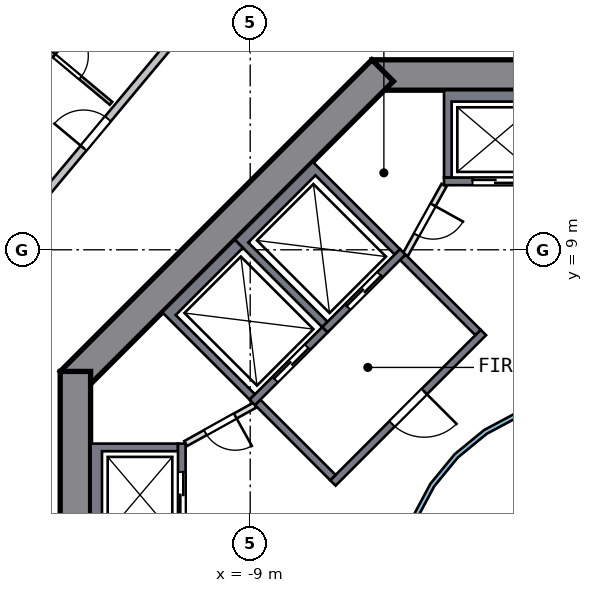
"""IFC4 building model, lengths in metres.
Left out: names, types, materials, properties, quantities, classifications, styles, units other than length and angle.
Written with IfcOpenShell. Run it as: python <this file> out.ifc"""

import sys

from ifc_helpers import new_model, si_unit, direction, frame, frame_2d, origin, place, context, subcontext, project, spatial, polyline, rectangle, outline, extrude, element, fill, save


model = new_model("IFC4")
c1 = context("Model", 3, precision=1e-05, world=origin(), true_north=direction((0.0, 1.0)))
c2 = subcontext(c1, "Body", "Model", "MODEL_VIEW")
j1 = project(units=[si_unit("LENGTHUNIT", "METRE"), si_unit("PLANEANGLEUNIT", "RADIAN")], contexts=[c1])
p1 = place(None, origin())
s1 = spatial("IfcSite", under=j1, at=p1, CompositionType="ELEMENT")
p2 = place(p1, origin())
s2 = spatial("IfcBuilding", under=s1, at=p2, CompositionType="ELEMENT")
p3 = place(p2, frame((0.0, 0.0, 115.0)))
s3 = spatial("IfcBuildingStorey", under=s2, at=p3, CompositionType="ELEMENT", Elevation=115.0)
p4 = place(p3, frame((5.799, 13.6, 0.0), z_axis=(0.0, 0.0, 1.0), x_axis=(-1.0, 0.0, 0.0)))
e1 = element("IfcWall", 1, at=p4, inside=s3, PredefinedType="SHEAR", context=c2, shape_type="SweptSolid", body=[
    extrude(rectangle(XDim=11.598, YDim=0.8, at=frame_2d((5.799, 0.0))), origin(), (0.0, 0.0, 1.0), 3.5),
])
p5 = place(p4, frame((4.899, 0.0, 0.0)))
e2 = element("IfcOpeningElement", 2, at=p5, cuts=e1, PredefinedType="OPENING", context=c2, shape_type="SweptSolid", body=[
    extrude(rectangle(XDim=1.8, YDim=2.1, at=frame_2d((0.9, 1.05))), frame((0.0, 0.41, 0.0), z_axis=(0.0, -1.0, 0.0), x_axis=(1.0, 0.0, 0.0)), (0.0, 0.0, 1.0), 0.82),
])
p6 = place(p3, frame((-5.516, 13.717, 0.0), z_axis=(0.0, 0.0, 1.0), x_axis=(-0.707106781, -0.707106781, 0.0)))
e3 = element("IfcWall", 3, at=p6, inside=s3, PredefinedType="SHEAR", context=c2, shape_type="SweptSolid", body=[
    extrude(rectangle(XDim=11.598, YDim=0.8, at=frame_2d((5.799, 0.0))), origin(), (0.0, 0.0, 1.0), 3.5),
])
p7 = place(p3, frame((-13.6, 5.799, 0.0), z_axis=(0.0, 0.0, 1.0), x_axis=(0.0, -1.0, 0.0)))
e4 = element("IfcWall", 4, at=p7, inside=s3, PredefinedType="SHEAR", context=c2, shape_type="SweptSolid", body=[
    extrude(rectangle(XDim=11.598, YDim=0.8, at=frame_2d((5.799, 0.0))), origin(), (0.0, 0.0, 1.0), 3.5),
])
p8 = place(p7, frame((4.899, 0.0, 0.0)))
e5 = element("IfcOpeningElement", 5, at=p8, cuts=e4, PredefinedType="OPENING", context=c2, shape_type="SweptSolid", body=[
    extrude(rectangle(XDim=1.8, YDim=2.1, at=frame_2d((0.9, 1.05))), frame((0.0, 0.41, 0.0), z_axis=(0.0, -1.0, 0.0), x_axis=(1.0, 0.0, 0.0)), (0.0, 0.0, 1.0), 0.82),
])
p9 = place(p3, origin())
e6 = element("IfcWall", 6, at=p9, inside=s3, PredefinedType="SOLIDWALL", context=c2, shape_type="SweptSolid", body=[
    extrude(outline(polyline([(-3.9, 10.9), (-3.9, 13.2), (-1.2, 13.2), (-1.2, 10.9), (-1.4, 10.9), (-1.4, 12.9), (-3.7, 12.9), (-3.7, 10.9), (-3.9, 10.9)])), origin(), (0.0, 0.0, 1.0), 3.19),
])
p10 = place(p3, frame((-1.2, 10.8, 0.0), z_axis=(0.0, 0.0, 1.0), x_axis=(-1.0, 0.0, 0.0)))
e7 = element("IfcWall", 7, at=p10, inside=s3, PredefinedType="SOLIDWALL", context=c2, shape_type="SweptSolid", body=[
    extrude(rectangle(XDim=2.7, YDim=0.2, at=frame_2d((1.35, 0.0))), origin(), (0.0, 0.0, 1.0), 3.19),
])
p11 = place(p10, frame((0.75, 0.0, 0.0)))
e8 = element("IfcOpeningElement", 8, at=p11, cuts=e7, PredefinedType="OPENING", context=c2, shape_type="SweptSolid", body=[
    extrude(rectangle(XDim=1.2, YDim=2.1, at=frame_2d((0.6, 1.05))), frame((0.0, 0.11, 0.0), z_axis=(0.0, -1.0, 0.0), x_axis=(1.0, 0.0, 0.0)), (0.0, 0.0, 1.0), 0.22),
])
p12 = place(p3, origin())
e9 = element("IfcWall", 9, at=p12, inside=s3, PredefinedType="SOLIDWALL", context=c2, shape_type="SweptSolid", body=[
    extrude(outline(polyline([(-13.2, 3.9), (-10.9, 3.9), (-10.9, 3.7), (-12.9, 3.7), (-12.9, 1.4), (-10.9, 1.4), (-10.9, 1.2), (-13.2, 1.2), (-13.2, 3.9)])), origin(), (0.0, 0.0, 1.0), 3.19),
])
p13 = place(p3, frame((-10.8, 1.2, 0.0), z_axis=(0.0, 0.0, 1.0), x_axis=(0.0, 1.0, 0.0)))
e10 = element("IfcWall", 10, at=p13, inside=s3, PredefinedType="SOLIDWALL", context=c2, shape_type="SweptSolid", body=[
    extrude(rectangle(XDim=2.7, YDim=0.2, at=frame_2d((1.35, 0.0))), origin(), (0.0, 0.0, 1.0), 3.19),
])
p14 = place(p13, frame((0.75, 0.0, 0.0)))
e11 = element("IfcOpeningElement", 11, at=p14, cuts=e10, PredefinedType="OPENING", context=c2, shape_type="SweptSolid", body=[
    extrude(rectangle(XDim=1.2, YDim=2.1, at=frame_2d((0.6, 1.05))), frame((0.0, 0.11, 0.0), z_axis=(0.0, -1.0, 0.0), x_axis=(1.0, 0.0, 0.0)), (0.0, 0.0, 1.0), 0.22),
])
p15 = place(p3, origin())
e12 = element("IfcWall", 12, at=p15, inside=s3, PredefinedType="SOLIDWALL", context=c2, shape_type="SweptSolid", body=[
    extrude(outline(polyline([(-9.405, 9.263), (-7.354, 11.314), (-5.056, 9.016), (-5.197, 8.874), (-7.283, 10.96), (-9.051, 9.192), (-6.965, 7.106), (-7.106, 6.965), (-9.405, 9.263)])), origin(), (0.0, 0.0, 1.0), 3.19),
])
p16 = place(p3, frame((-4.985, 8.945, 0.0), z_axis=(0.0, 0.0, 1.0), x_axis=(-0.707106781, -0.707106781, 0.0)))
e13 = element("IfcWall", 13, at=p16, inside=s3, PredefinedType="SOLIDWALL", context=c2, shape_type="SweptSolid", body=[
    extrude(rectangle(XDim=2.9, YDim=0.2, at=frame_2d((1.45, 0.0))), origin(), (0.0, 0.0, 1.0), 3.19),
])
p17 = place(p16, frame((0.85, 0.0, 0.0)))
e14 = element("IfcOpeningElement", 14, at=p17, cuts=e13, PredefinedType="OPENING", context=c2, shape_type="SweptSolid", body=[
    extrude(rectangle(XDim=1.2, YDim=2.1, at=frame_2d((0.6, 1.05))), frame((0.0, 0.11, 0.0), z_axis=(0.0, -1.0, 0.0), x_axis=(1.0, 0.0, 0.0)), (0.0, 0.0, 1.0), 0.22),
])
p18 = place(p3, origin())
e15 = element("IfcWall", 15, at=p18, inside=s3, PredefinedType="SOLIDWALL", context=c2, shape_type="SweptSolid", body=[
    extrude(outline(polyline([(-11.314, 7.354), (-9.405, 9.263), (-9.192, 9.051), (-10.96, 7.283), (-8.874, 5.197), (-9.016, 5.056), (-11.314, 7.354)])), origin(), (0.0, 0.0, 1.0), 3.19),
])
p19 = place(p3, frame((-7.036, 6.894, 0.0), z_axis=(0.0, 0.0, 1.0), x_axis=(-0.707106781, -0.707106781, 0.0)))
e16 = element("IfcWall", 16, at=p19, inside=s3, PredefinedType="SOLIDWALL", context=c2, shape_type="SweptSolid", body=[
    extrude(rectangle(XDim=2.7, YDim=0.2, at=frame_2d((1.35, 0.0))), origin(), (0.0, 0.0, 1.0), 3.19),
])
p20 = place(p19, frame((0.65, 0.0, 0.0)))
e17 = element("IfcOpeningElement", 17, at=p20, cuts=e16, PredefinedType="OPENING", context=c2, shape_type="SweptSolid", body=[
    extrude(rectangle(XDim=1.2, YDim=2.1, at=frame_2d((0.6, 1.05))), frame((0.0, 0.11, 0.0), z_axis=(0.0, -1.0, 0.0), x_axis=(1.0, 0.0, 0.0)), (0.0, 0.0, 1.0), 0.22),
])
p21 = place(p3, frame((-2.864, 6.823, 0.0), z_axis=(0.0, 0.0, 1.0), x_axis=(-0.707106781, -0.707106781, 0.0)))
e18 = element("IfcWall", 18, at=p21, inside=s3, PredefinedType="SOLIDWALL", context=c2, shape_type="SweptSolid", body=[
    extrude(rectangle(XDim=5.6, YDim=0.2, at=frame_2d((2.8, 0.0))), origin(), (0.0, 0.0, 1.0), 3.19),
])
p22 = place(p21, frame((2.2, 0.0, 0.0)))
e19 = element("IfcOpeningElement", 19, at=p22, cuts=e18, PredefinedType="OPENING", context=c2, shape_type="SweptSolid", body=[
    extrude(rectangle(XDim=1.2, YDim=2.1, at=frame_2d((0.6, 1.05))), frame((0.0, 0.11, 0.0), z_axis=(0.0, -1.0, 0.0), x_axis=(1.0, 0.0, 0.0)), (0.0, 0.0, 1.0), 0.22),
])
for number, where, z_axis, x_axis in (
    (20, (-3.005, 6.823, 0.0), (0.0, 0.0, 1.0), (-0.707, 0.707, 0.0)),
    (21, (-6.823, 3.005, 0.0), (0.0, 0.0, 1.0), (-0.707, 0.707, 0.0)),
):
    element("IfcWall", number, at=place(p3, frame(where, z_axis=z_axis, x_axis=x_axis)), inside=s3, PredefinedType="SOLIDWALL", context=c2, shape_type="SweptSolid", body=[
        extrude(rectangle(XDim=2.8, YDim=0.2, at=frame_2d((1.4, 0.0))), origin(), (0.0, 0.0, 1.0), 3.19),
    ])
p23 = place(p3, frame((-3.9, 10.7, 0.0), z_axis=(0.0, 0.0, 1.0), x_axis=(-0.485692555, -0.874129705, 0.0)))
e22 = element("IfcWall", 22, at=p23, inside=s3, PredefinedType="PARTITIONING", context=c2, shape_type="SweptSolid", body=[
    extrude(rectangle(XDim=2.089, YDim=0.15, at=frame_2d((1.044, 0.0))), origin(), (0.0, 0.0, 1.0), 3.19),
])
p24 = place(p23, frame((0.594, 0.0, 0.0)))
e23 = element("IfcOpeningElement", 23, at=p24, cuts=e22, PredefinedType="OPENING", context=c2, shape_type="SweptSolid", body=[
    extrude(rectangle(XDim=0.9, YDim=2.1, at=frame_2d((0.45, 1.05))), frame((0.0, 0.085, 0.0), z_axis=(0.0, -1.0, 0.0), x_axis=(1.0, 0.0, 0.0)), (0.0, 0.0, 1.0), 0.17),
])
p25 = place(p3, frame((-8.874, 4.914, 0.0), z_axis=(0.0, 0.0, 1.0), x_axis=(-0.874129705, -0.485692555, 0.0)))
e24 = element("IfcWall", 24, at=p25, inside=s3, PredefinedType="PARTITIONING", context=c2, shape_type="SweptSolid", body=[
    extrude(rectangle(XDim=2.089, YDim=0.15, at=frame_2d((1.044, 0.0))), origin(), (0.0, 0.0, 1.0), 3.19),
])
p26 = place(p25, frame((0.594, 0.0, 0.0)))
e25 = element("IfcOpeningElement", 25, at=p26, cuts=e24, PredefinedType="OPENING", context=c2, shape_type="SweptSolid", body=[
    extrude(rectangle(XDim=0.9, YDim=2.1, at=frame_2d((0.45, 1.05))), frame((0.0, 0.085, 0.0), z_axis=(0.0, -1.0, 0.0), x_axis=(1.0, 0.0, 0.0)), (0.0, 0.0, 1.0), 0.17),
])
p27 = place(p3, origin())
e26 = element("IfcWall", 26, at=p27, inside=s3, PredefinedType="SOLIDWALL", context=c2, shape_type="SweptSolid", body=[
    extrude(outline(polyline([(5.021, -0.999), (4.73, -1.959), (4.257, -2.844), (3.62, -3.62), (2.844, -4.257), (1.959, -4.73), (0.999, -5.021), (0.0, -5.12), (-0.999, -5.021), (-1.959, -4.73), (-2.844, -4.257), (-3.62, -3.62), (-4.257, -2.844), (-4.73, -1.959), (-5.021, -0.999), (-5.12, 0.0), (-5.021, 0.999), (-4.73, 1.959), (-4.257, 2.844), (-3.62, 3.62), (-2.844, 4.257), (-1.959, 4.73), (-0.999, 5.021), (0.0, 5.12), (0.999, 5.021), (1.959, 4.73), (2.844, 4.257), (3.62, 3.62), (4.257, 2.844), (4.73, 1.959), (5.021, 0.999), (5.12, 0.0), (5.021, -0.999)]), holes=[polyline([(4.904, 0.976), (4.619, 1.913), (4.157, 2.778), (3.535, 3.535), (2.778, 4.157), (1.913, 4.619), (0.976, 4.904), (0.0, 5.0), (-0.976, 4.904), (-1.913, 4.619), (-2.778, 4.157), (-3.535, 3.535), (-4.157, 2.778), (-4.619, 1.913), (-4.904, 0.976), (-5.0, 0.0), (-4.904, -0.976), (-4.619, -1.913), (-4.157, -2.778), (-3.535, -3.535), (-2.778, -4.157), (-1.913, -4.619), (-0.976, -4.904), (0.0, -5.0), (0.976, -4.904), (1.913, -4.619), (2.778, -4.157), (3.535, -3.535), (4.157, -2.778), (4.619, -1.913), (4.904, -0.976), (5.0, 0.0), (4.904, 0.976)])]), origin(), (0.0, 0.0, 1.0), 3.19),
])
p28 = place(p3, frame((-16.684, 7.724, 0.0), z_axis=(0.0, 0.0, 1.0), x_axis=(0.640650848, 0.767832332, 0.0)))
e27 = element("IfcWall", 27, at=p28, inside=s3, PredefinedType="SOLIDWALL", context=c2, shape_type="SweptSolid", body=[
    extrude(rectangle(XDim=9.316, YDim=0.2, at=frame_2d((4.658, 0.0))), origin(), (0.0, 0.0, 1.0), 3.19),
])
p29 = place(p28, frame((5.15, 0.0, 0.0)))
e28 = element("IfcOpeningElement", 28, at=p29, cuts=e27, PredefinedType="OPENING", context=c2, shape_type="SweptSolid", body=[
    extrude(rectangle(XDim=1.0, YDim=2.1, at=frame_2d((0.5, 1.05))), frame((0.0, 0.11, 0.0), z_axis=(0.0, -1.0, 0.0), x_axis=(1.0, 0.0, 0.0)), (0.0, 0.0, 1.0), 0.22),
])
p30 = place(p3, frame((-15.043, 14.841, 0.0), z_axis=(0.0, 0.0, 1.0), x_axis=(0.767833833, -0.64064905, 0.0)))
e29 = element("IfcWall", 29, at=p30, inside=s3, PredefinedType="PARTITIONING", context=c2, shape_type="SweptSolid", body=[
    extrude(rectangle(XDim=3.1, YDim=0.1, at=frame_2d((1.55, 0.0))), origin(), (0.0, 0.0, 1.0), 3.19),
])
p31 = place(p30, frame((1.15, 0.0, 0.0)))
e30 = element("IfcOpeningElement", 30, at=p31, cuts=e29, PredefinedType="OPENING", context=c2, shape_type="SweptSolid", body=[
    extrude(rectangle(XDim=0.9, YDim=2.1, at=frame_2d((0.45, 1.05))), frame((0.0, 0.06, 0.0), z_axis=(0.0, -1.0, 0.0), x_axis=(1.0, 0.0, 0.0)), (0.0, 0.0, 1.0), 0.12),
])
p32 = place(p11, origin())
e31 = element("IfcDoor", 31, at=p32, inside=s3, OperationType="DOUBLE_DOOR_SLIDING", PredefinedType="DOOR", context=c2, shape_type="SweptSolid", body=[
    extrude(rectangle(XDim=1.2, YDim=2.1, at=frame_2d((0.6, 1.05))), frame((0.0, 0.025, 0.0), z_axis=(0.0, -1.0, 0.0), x_axis=(1.0, 0.0, 0.0)), (0.0, 0.0, 1.0), 0.05),
])
fill(e8, e31)
p33 = place(p14, origin())
e32 = element("IfcDoor", 32, at=p33, inside=s3, OperationType="DOUBLE_DOOR_SLIDING", PredefinedType="DOOR", context=c2, shape_type="SweptSolid", body=[
    extrude(rectangle(XDim=1.2, YDim=2.1, at=frame_2d((0.6, 1.05))), frame((0.0, 0.025, 0.0), z_axis=(0.0, -1.0, 0.0), x_axis=(1.0, 0.0, 0.0)), (0.0, 0.0, 1.0), 0.05),
])
fill(e11, e32)
p34 = place(p17, origin())
e33 = element("IfcDoor", 33, at=p34, inside=s3, OperationType="DOUBLE_DOOR_SLIDING", PredefinedType="DOOR", context=c2, shape_type="SweptSolid", body=[
    extrude(rectangle(XDim=1.2, YDim=2.1, at=frame_2d((0.6, 1.05))), frame((0.0, 0.025, 0.0), z_axis=(0.0, -1.0, 0.0), x_axis=(1.0, 0.0, 0.0)), (0.0, 0.0, 1.0), 0.05),
])
fill(e14, e33)
p35 = place(p20, origin())
e34 = element("IfcDoor", 34, at=p35, inside=s3, OperationType="DOUBLE_DOOR_SLIDING", PredefinedType="DOOR", context=c2, shape_type="SweptSolid", body=[
    extrude(rectangle(XDim=1.2, YDim=2.1, at=frame_2d((0.6, 1.05))), frame((0.0, 0.025, 0.0), z_axis=(0.0, -1.0, 0.0), x_axis=(1.0, 0.0, 0.0)), (0.0, 0.0, 1.0), 0.05),
])
fill(e17, e34)
p36 = place(p22, origin())
e35 = element("IfcDoor", 35, at=p36, inside=s3, OperationType="SINGLE_SWING_LEFT", PredefinedType="DOOR", context=c2, shape_type="SweptSolid", body=[
    extrude(rectangle(XDim=1.2, YDim=2.1, at=frame_2d((0.6, 1.05))), frame((0.0, 0.025, 0.0), z_axis=(0.0, -1.0, 0.0), x_axis=(1.0, 0.0, 0.0)), (0.0, 0.0, 1.0), 0.05),
])
fill(e19, e35)
p37 = place(p24, origin())
e36 = element("IfcDoor", 36, at=p37, inside=s3, OperationType="SINGLE_SWING_LEFT", PredefinedType="DOOR", context=c2, shape_type="SweptSolid", body=[
    extrude(rectangle(XDim=0.9, YDim=2.1, at=frame_2d((0.45, 1.05))), frame((0.0, 0.025, 0.0), z_axis=(0.0, -1.0, 0.0), x_axis=(1.0, 0.0, 0.0)), (0.0, 0.0, 1.0), 0.05),
])
fill(e23, e36)
p38 = place(p26, origin())
e37 = element("IfcDoor", 37, at=p38, inside=s3, OperationType="SINGLE_SWING_LEFT", PredefinedType="DOOR", context=c2, shape_type="SweptSolid", body=[
    extrude(rectangle(XDim=0.9, YDim=2.1, at=frame_2d((0.45, 1.05))), frame((0.0, 0.025, 0.0), z_axis=(0.0, -1.0, 0.0), x_axis=(1.0, 0.0, 0.0)), (0.0, 0.0, 1.0), 0.05),
])
fill(e25, e37)
p39 = place(p29, origin())
e38 = element("IfcDoor", 38, at=p39, inside=s3, OperationType="SINGLE_SWING_LEFT", PredefinedType="DOOR", context=c2, shape_type="SweptSolid", body=[
    extrude(rectangle(XDim=1.0, YDim=2.1, at=frame_2d((0.5, 1.05))), frame((0.0, 0.025, 0.0), z_axis=(0.0, -1.0, 0.0), x_axis=(1.0, 0.0, 0.0)), (0.0, 0.0, 1.0), 0.05),
])
fill(e28, e38)
p40 = place(p31, origin())
e39 = element("IfcDoor", 39, at=p40, inside=s3, OperationType="SINGLE_SWING_LEFT", PredefinedType="DOOR", context=c2, shape_type="SweptSolid", body=[
    extrude(rectangle(XDim=0.9, YDim=2.1, at=frame_2d((0.45, 1.05))), frame((0.0, 0.025, 0.0), z_axis=(0.0, -1.0, 0.0), x_axis=(1.0, 0.0, 0.0)), (0.0, 0.0, 1.0), 0.05),
])
fill(e30, e39)
save(model, sys.argv[1])
